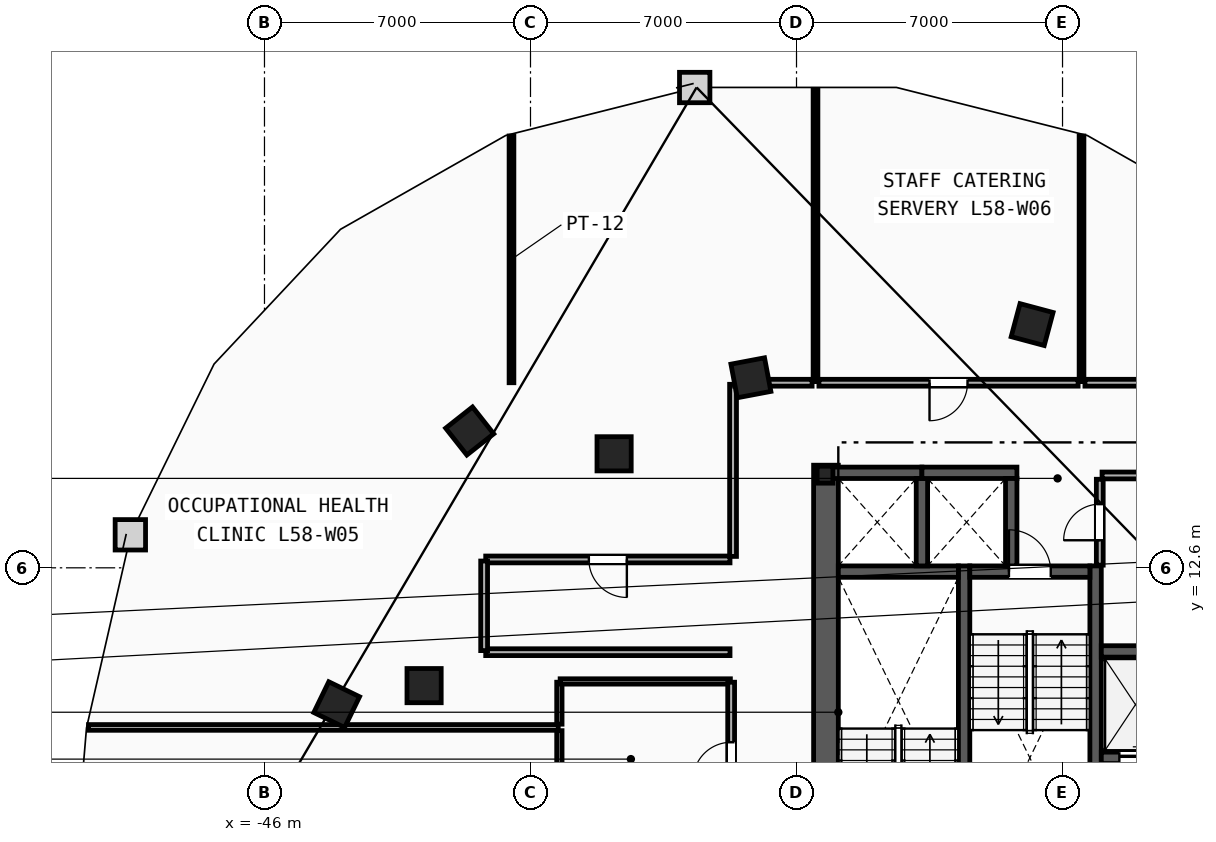
"""IFC4 building model, lengths in metres.
Left out: names, types, materials, properties, quantities, classifications, styles, units other than length and angle.
Written with IfcOpenShell. Run it as: python <this file> out.ifc"""

import sys

from ifc_helpers import new_model, si_unit, direction, frame, frame_2d, origin, origin_2d, place, context, subcontext, project, spatial, rectangle, i_section, extrude, element, fill, save


model = new_model("IFC4")
c1 = context("Model", 3, precision=1e-05, world=origin(), true_north=direction((0.0, 1.0)))
c2 = subcontext(c1, "Body", "Model", "MODEL_VIEW")
j1 = project(units=[si_unit("LENGTHUNIT", "METRE"), si_unit("PLANEANGLEUNIT", "RADIAN")], contexts=[c1])
p1 = place(None, origin())
s1 = spatial("IfcSite", under=j1, at=p1, CompositionType="ELEMENT")
p2 = place(p1, origin())
s2 = spatial("IfcBuilding", under=s1, at=p2, CompositionType="ELEMENT")
p3 = place(p2, frame((0.0, 0.0, 220.6)))
s3 = spatial("IfcBuildingStorey", under=s2, at=p3, CompositionType="ELEMENT", Elevation=220.6)
p4 = place(p3, frame((-31.25, 15.05, 0.0), z_axis=(0.0, 0.0, 1.0), x_axis=(1.0, 0.0, 0.0)))
e1 = element("IfcColumn", 1, at=p4, inside=s3, PredefinedType="COLUMN", context=c2, shape_type="SweptSolid", body=[
    extrude(i_section(OverallWidth=0.416, OverallDepth=0.446, WebThickness=0.039, FlangeThickness=0.063, FilletRadius=0.018, at=origin_2d()), origin(), (0.0, 0.0, 1.0), 3.6),
])
for number, where, z_axis, x_axis in (
    (2, (-41.8, 9.5, 0.0), (0.0, 0.0, 1.0), (1.0, 0.0, 0.0)),
    (3, (-36.8, 15.6, 0.0), (0.0, 0.0, 1.0), (1.0, 0.0, 0.0)),
    (4, (-25.8, 19.0, 0.0), (0.0, 0.0, 1.0), (-0.966, 0.259, 0.0)),
    (5, (-33.2, 17.6, 0.0), (0.0, 0.0, 1.0), (-0.983, -0.186, 0.0)),
    (6, (-40.6, 16.2, 0.0), (0.0, 0.0, 1.0), (-0.785, -0.619, 0.0)),
    (7, (-44.1, 9.0, 0.0), (0.0, 0.0, 1.0), (-0.437, -0.899, 0.0)),
):
    element("IfcColumn", number, at=place(p3, frame(where, z_axis=z_axis, x_axis=x_axis)), inside=s3, PredefinedType="COLUMN", context=c2, shape_type="SweptSolid", body=[
        extrude(rectangle(XDim=0.9, YDim=0.9, at=origin_2d()), origin(), (0.0, 0.0, 1.0), 3.6),
    ])
p5 = place(p3, frame((-31.225, 1.97, 0.0), z_axis=(0.0, 0.0, 1.0), x_axis=(0.0, 1.0, 0.0)))
e8 = element("IfcWall", 8, at=p5, inside=s3, PredefinedType="SHEAR", context=c2, shape_type="SweptSolid", body=[
    extrude(rectangle(XDim=13.33, YDim=0.65, at=frame_2d((6.665, 0.0))), origin(), (0.0, 0.0, 1.0), 3.34),
])
for number, where, z_axis, x_axis in (
    (9, (-27.59, 1.97, 0.0), (0.0, 0.0, 1.0), (0.0, 1.0, 0.0)),
    (10, (-24.13, 1.97, 0.0), (0.0, 0.0, 1.0), (0.0, 1.0, 0.0)),
):
    element("IfcWall", number, at=place(p3, frame(where, z_axis=z_axis, x_axis=x_axis)), inside=s3, PredefinedType="SHEAR", context=c2, shape_type="SweptSolid", body=[
        extrude(rectangle(XDim=10.68, YDim=0.3, at=frame_2d((5.34, 0.0))), origin(), (0.0, 0.0, 1.0), 3.34),
    ])
p6 = place(p3, frame((-30.9, 12.5, 0.0), z_axis=(0.0, 0.0, 1.0), x_axis=(1.0, 0.0, 0.0)))
e11 = element("IfcWall", 11, at=p6, inside=s3, PredefinedType="SHEAR", context=c2, shape_type="SweptSolid", body=[
    extrude(rectangle(XDim=3.16, YDim=0.3, at=frame_2d((1.58, 0.0))), origin(), (0.0, 0.0, 1.0), 3.34),
])
p7 = place(p3, frame((-27.44, 12.5, 0.0), z_axis=(0.0, 0.0, 1.0), x_axis=(1.0, 0.0, 0.0)))
e12 = element("IfcWall", 12, at=p7, inside=s3, PredefinedType="SHEAR", context=c2, shape_type="SweptSolid", body=[
    extrude(rectangle(XDim=3.16, YDim=0.3, at=frame_2d((1.58, 0.0))), origin(), (0.0, 0.0, 1.0), 3.34),
])
p8 = place(p7, frame((1.03, 0.0, 0.0)))
e13 = element("IfcOpeningElement", 13, at=p8, cuts=e12, PredefinedType="OPENING", context=c2, shape_type="SweptSolid", body=[
    extrude(rectangle(XDim=1.1, YDim=2.15, at=frame_2d((0.55, 1.075))), frame((0.0, 0.16, 0.0), z_axis=(0.0, -1.0, 0.0), x_axis=(1.0, 0.0, 0.0)), (0.0, 0.0, 1.0), 0.32),
])
p9 = place(p3, frame((-23.98, 7.6, 0.0), z_axis=(0.0, 0.0, 1.0), x_axis=(1.0, 0.0, 0.0)))
e14 = element("IfcWall", 14, at=p9, inside=s3, PredefinedType="SHEAR", context=c2, shape_type="SweptSolid", body=[
    extrude(rectangle(XDim=2.1, YDim=0.3, at=frame_2d((1.05, 0.0))), origin(), (0.0, 0.0, 1.0), 3.34),
])
p10 = place(p9, frame((0.475, 0.0, 0.0)))
e15 = element("IfcOpeningElement", 15, at=p10, cuts=e14, PredefinedType="OPENING", context=c2, shape_type="SweptSolid", body=[
    extrude(rectangle(XDim=1.15, YDim=2.2, at=frame_2d((0.575, 1.1))), frame((0.0, 0.16, 0.0), z_axis=(0.0, -1.0, 0.0), x_axis=(1.0, 0.0, 0.0)), (0.0, 0.0, 1.0), 0.32),
])
p11 = place(p3, frame((-23.98, 10.4, 0.0), z_axis=(0.0, 0.0, 1.0), x_axis=(1.0, 0.0, 0.0)))
e16 = element("IfcWall", 16, at=p11, inside=s3, PredefinedType="SHEAR", context=c2, shape_type="SweptSolid", body=[
    extrude(rectangle(XDim=2.1, YDim=0.3, at=frame_2d((1.05, 0.0))), origin(), (0.0, 0.0, 1.0), 3.34),
])
p12 = place(p3, frame((-31.2, 15.1, 0.0), z_axis=(0.0, 0.0, 1.0), x_axis=(1.0, 0.0, 0.0)))
e17 = element("IfcWall", 17, at=p12, inside=s3, PredefinedType="SHEAR", context=c2, shape_type="SweptSolid", body=[
    extrude(rectangle(XDim=2.5, YDim=0.3, at=frame_2d((1.25, 0.0))), origin(), (0.0, 0.0, 1.0), 3.34),
])
p13 = place(p3, frame((-28.7, 12.65, 0.0), z_axis=(0.0, 0.0, 1.0), x_axis=(0.0, 1.0, 0.0)))
e18 = element("IfcWall", 18, at=p13, inside=s3, PredefinedType="SHEAR", context=c2, shape_type="SweptSolid", body=[
    extrude(rectangle(XDim=2.3, YDim=0.3, at=frame_2d((1.15, 0.0))), origin(), (0.0, 0.0, 1.0), 3.34),
])
p14 = place(p3, frame((-28.7, 15.1, 0.0), z_axis=(0.0, 0.0, 1.0), x_axis=(1.0, 0.0, 0.0)))
e19 = element("IfcWall", 19, at=p14, inside=s3, PredefinedType="SHEAR", context=c2, shape_type="SweptSolid", body=[
    extrude(rectangle(XDim=2.5, YDim=0.3, at=frame_2d((1.25, 0.0))), origin(), (0.0, 0.0, 1.0), 3.34),
])
p15 = place(p3, frame((-26.35, 12.65, 0.0), z_axis=(0.0, 0.0, 1.0), x_axis=(0.0, 1.0, 0.0)))
e20 = element("IfcWall", 20, at=p15, inside=s3, PredefinedType="SHEAR", context=c2, shape_type="SweptSolid", body=[
    extrude(rectangle(XDim=2.3, YDim=0.3, at=frame_2d((1.15, 0.0))), origin(), (0.0, 0.0, 1.0), 3.34),
])
p16 = place(p3, frame((-23.96, 15.03, 0.0), z_axis=(0.0, 0.0, 1.0), x_axis=(1.0, 0.0, 0.0)))
e21 = element("IfcWall", 21, at=p16, inside=s3, PredefinedType="PARTITIONING", context=c2, shape_type="SweptSolid", body=[
    extrude(rectangle(XDim=2.61, YDim=0.18, at=frame_2d((1.305, 0.0))), origin(), (0.0, 0.0, 1.0), 2.413),
])
p17 = place(p3, frame((-24.02, 12.67, 0.0), z_axis=(0.0, 0.0, 1.0), x_axis=(0.0, 1.0, 0.0)))
e22 = element("IfcWall", 22, at=p17, inside=s3, PredefinedType="PARTITIONING", context=c2, shape_type="SweptSolid", body=[
    extrude(rectangle(XDim=2.26, YDim=0.18, at=frame_2d((1.13, 0.0))), origin(), (0.0, 0.0, 1.0), 3.34),
])
p18 = place(p17, frame((0.655, 0.0, 0.0)))
e23 = element("IfcOpeningElement", 23, at=p18, cuts=e22, PredefinedType="OPENING", context=c2, shape_type="SweptSolid", body=[
    extrude(rectangle(XDim=0.95, YDim=2.1, at=frame_2d((0.475, 1.05))), frame((0.0, 0.1, 0.0), z_axis=(0.0, -1.0, 0.0), x_axis=(1.0, 0.0, 0.0)), (0.0, 0.0, 1.0), 0.2),
])
p19 = place(p3, frame((-38.24, 5.415, 0.0), z_axis=(0.0, 0.0, 1.0), x_axis=(0.0, 1.0, 0.0)))
e24 = element("IfcWall", 24, at=p19, inside=s3, PredefinedType="PARTITIONING", context=c2, shape_type="SweptSolid", body=[
    extrude(rectangle(XDim=2.9, YDim=0.14, at=frame_2d((1.45, 0.0))), origin(), (0.0, 0.0, 1.0), 3.34),
])
p20 = place(p3, frame((-38.24, 8.485, 0.0), z_axis=(0.0, 0.0, 1.0), x_axis=(0.0, 1.0, 0.0)))
e25 = element("IfcWall", 25, at=p20, inside=s3, PredefinedType="PARTITIONING", context=c2, shape_type="SweptSolid", body=[
    extrude(rectangle(XDim=1.105, YDim=0.14, at=frame_2d((0.552, 0.0))), origin(), (0.0, 0.0, 1.0), 3.34),
])
p21 = place(p3, frame((-38.22, 9.61, 0.0), z_axis=(0.0, 0.0, 1.0), x_axis=(1.0, 0.0, 0.0)))
e26 = element("IfcWall", 26, at=p21, inside=s3, PredefinedType="PARTITIONING", context=c2, shape_type="SweptSolid", body=[
    extrude(rectangle(XDim=4.48, YDim=0.14, at=frame_2d((2.24, 0.0))), origin(), (0.0, 0.0, 1.0), 3.34),
])
p22 = place(p3, frame((-33.72, 5.43, 0.0), z_axis=(0.0, 0.0, 1.0), x_axis=(0.0, 1.0, 0.0)))
e27 = element("IfcWall", 27, at=p22, inside=s3, PredefinedType="PARTITIONING", context=c2, shape_type="SweptSolid", body=[
    extrude(rectangle(XDim=4.16, YDim=0.18, at=frame_2d((2.08, 0.0))), origin(), (0.0, 0.0, 1.0), 3.34),
])
p23 = place(p22, frame((1.58, 0.0, 0.0)))
e28 = element("IfcOpeningElement", 28, at=p23, cuts=e27, PredefinedType="OPENING", context=c2, shape_type="SweptSolid", body=[
    extrude(rectangle(XDim=1.0, YDim=2.15, at=frame_2d((0.5, 1.075))), frame((0.0, 0.1, 0.0), z_axis=(0.0, -1.0, 0.0), x_axis=(1.0, 0.0, 0.0)), (0.0, 0.0, 1.0), 0.2),
])
p24 = place(p3, frame((-50.63, 8.4, 0.0), z_axis=(0.0, 0.0, 1.0), x_axis=(1.0, 0.0, 0.0)))
e29 = element("IfcWall", 29, at=p24, inside=s3, PredefinedType="PARTITIONING", context=c2, shape_type="SweptSolid", body=[
    extrude(rectangle(XDim=12.36, YDim=0.15, at=frame_2d((6.18, 0.0))), origin(), (0.0, 0.0, 1.0), 3.34),
])
p25 = place(p3, frame((-39.5, 17.47, 0.0), z_axis=(0.0, 0.0, 1.0), x_axis=(0.0, 1.0, 0.0)))
e30 = element("IfcWall", 30, at=p25, inside=s3, PredefinedType="PARTITIONING", context=c2, shape_type="SweptSolid", body=[
    extrude(rectangle(XDim=6.493, YDim=0.125, at=frame_2d((3.246, 0.0))), origin(), (0.0, 0.0, 1.0), 3.34),
])
p26 = place(p3, frame((-31.5, 17.5, 0.0), z_axis=(0.0, 0.0, 1.0), x_axis=(0.0, 1.0, 0.0)))
e31 = element("IfcWall", 31, at=p26, inside=s3, PredefinedType="PARTITIONING", context=c2, shape_type="SweptSolid", body=[
    extrude(rectangle(XDim=7.69, YDim=0.125, at=frame_2d((3.845, 0.0))), origin(), (0.0, 0.0, 1.0), 3.34),
])
p27 = place(p3, frame((-24.5, 17.5, 0.0), z_axis=(0.0, 0.0, 1.0), x_axis=(0.0, 1.0, 0.0)))
e32 = element("IfcWall", 32, at=p27, inside=s3, PredefinedType="PARTITIONING", context=c2, shape_type="SweptSolid", body=[
    extrude(rectangle(XDim=6.463, YDim=0.125, at=frame_2d((3.231, 0.0))), origin(), (0.0, 0.0, 1.0), 3.34),
])
p28 = place(p3, frame((-16.822, 17.47, 0.0), z_axis=(0.0, 0.0, 1.0), x_axis=(-1.0, 0.0, 0.0)))
e33 = element("IfcWall", 33, at=p28, inside=s3, PredefinedType="PARTITIONING", context=c2, shape_type="SweptSolid", body=[
    extrude(rectangle(XDim=7.588, YDim=0.18, at=frame_2d((3.794, 0.0))), origin(), (0.0, 0.0, 1.0), 3.34),
])
p29 = place(p3, frame((-33.75, 12.82, 0.0), z_axis=(0.0, 0.0, 1.0), x_axis=(-1.0, 0.0, 0.0)))
e34 = element("IfcWall", 34, at=p29, inside=s3, PredefinedType="PARTITIONING", context=c2, shape_type="SweptSolid", body=[
    extrude(rectangle(XDim=6.428, YDim=0.18, at=frame_2d((3.214, 0.0))), origin(), (0.0, 0.0, 1.0), 3.34),
])
p30 = place(p29, frame((2.714, 0.0, 0.0)))
e35 = element("IfcOpeningElement", 35, at=p30, cuts=e34, PredefinedType="OPENING", context=c2, shape_type="SweptSolid", body=[
    extrude(rectangle(XDim=1.0, YDim=2.15, at=frame_2d((0.5, 1.075))), frame((0.0, 0.1, 0.0), z_axis=(0.0, -1.0, 0.0), x_axis=(1.0, 0.0, 0.0)), (0.0, 0.0, 1.0), 0.2),
])
p31 = place(p3, frame((-40.178, 10.38, 0.0), z_axis=(0.0, 0.0, 1.0), x_axis=(1.0, 0.0, 0.0)))
e36 = element("IfcWall", 36, at=p31, inside=s3, PredefinedType="PARTITIONING", context=c2, shape_type="SweptSolid", body=[
    extrude(rectangle(XDim=6.428, YDim=0.18, at=frame_2d((3.214, 0.0))), origin(), (0.0, 0.0, 1.0), 3.34),
])
p32 = place(p3, frame((-33.67, 17.428, 0.0), z_axis=(0.0, 0.0, 1.0), x_axis=(0.0, -1.0, 0.0)))
e37 = element("IfcWall", 37, at=p32, inside=s3, PredefinedType="PARTITIONING", context=c2, shape_type="SweptSolid", body=[
    extrude(rectangle(XDim=4.529, YDim=0.18, at=frame_2d((2.264, 0.0))), origin(), (0.0, 0.0, 1.0), 3.34),
])
p33 = place(p3, frame((-40.22, 12.779, 0.0), z_axis=(0.0, 0.0, 1.0), x_axis=(0.0, -1.0, 0.0)))
e38 = element("IfcWall", 38, at=p33, inside=s3, PredefinedType="PARTITIONING", context=c2, shape_type="SweptSolid", body=[
    extrude(rectangle(XDim=2.357, YDim=0.18, at=frame_2d((1.179, 0.0))), origin(), (0.0, 0.0, 1.0), 3.34),
])
p34 = place(p3, frame((-31.59, 17.47, 0.0), z_axis=(0.0, 0.0, 1.0), x_axis=(-1.0, 0.0, 0.0)))
e39 = element("IfcWall", 39, at=p34, inside=s3, PredefinedType="PARTITIONING", context=c2, shape_type="SweptSolid", body=[
    extrude(rectangle(XDim=2.038, YDim=0.18, at=frame_2d((1.019, 0.0))), origin(), (0.0, 0.0, 1.0), 3.34),
])
p35 = place(p3, frame((-24.59, 17.47, 0.0), z_axis=(0.0, 0.0, 1.0), x_axis=(-1.0, 0.0, 0.0)))
e40 = element("IfcWall", 40, at=p35, inside=s3, PredefinedType="PARTITIONING", context=c2, shape_type="SweptSolid", body=[
    extrude(rectangle(XDim=6.82, YDim=0.18, at=frame_2d((3.41, 0.0))), origin(), (0.0, 0.0, 1.0), 3.34),
])
p36 = place(p35, frame((2.91, 0.0, 0.0)))
e41 = element("IfcOpeningElement", 41, at=p36, cuts=e40, PredefinedType="OPENING", context=c2, shape_type="SweptSolid", body=[
    extrude(rectangle(XDim=1.0, YDim=2.15, at=frame_2d((0.5, 1.075))), frame((0.0, 0.1, 0.0), z_axis=(0.0, -1.0, 0.0), x_axis=(1.0, 0.0, 0.0)), (0.0, 0.0, 1.0), 0.2),
])
p37 = place(p8, origin())
e42 = element("IfcDoor", 42, at=p37, inside=s3, OperationType="SINGLE_SWING_LEFT", PredefinedType="DOOR", context=c2, shape_type="SweptSolid", body=[
    extrude(rectangle(XDim=1.1, YDim=2.15, at=frame_2d((0.55, 1.075))), frame((0.0, 0.025, 0.0), z_axis=(0.0, -1.0, 0.0), x_axis=(1.0, 0.0, 0.0)), (0.0, 0.0, 1.0), 0.05),
])
fill(e13, e42)
p38 = place(p10, origin())
e43 = element("IfcDoor", 43, at=p38, inside=s3, OperationType="SLIDING_TO_LEFT", PredefinedType="TRAPDOOR", context=c2, shape_type="SweptSolid", body=[
    extrude(rectangle(XDim=1.15, YDim=2.2, at=frame_2d((0.575, 1.1))), frame((0.0, 0.025, 0.0), z_axis=(0.0, -1.0, 0.0), x_axis=(1.0, 0.0, 0.0)), (0.0, 0.0, 1.0), 0.05),
])
fill(e15, e43)
p39 = place(p36, origin())
e44 = element("IfcDoor", 44, at=p39, inside=s3, OperationType="SINGLE_SWING_RIGHT", PredefinedType="DOOR", context=c2, shape_type="SweptSolid", body=[
    extrude(rectangle(XDim=1.0, YDim=2.15, at=frame_2d((0.5, 1.075))), frame((0.0, 0.025, 0.0), z_axis=(0.0, -1.0, 0.0), x_axis=(1.0, 0.0, 0.0)), (0.0, 0.0, 1.0), 0.05),
])
fill(e41, e44)
p40 = place(p30, origin())
e45 = element("IfcDoor", 45, at=p40, inside=s3, OperationType="SINGLE_SWING_LEFT", PredefinedType="DOOR", context=c2, shape_type="SweptSolid", body=[
    extrude(rectangle(XDim=1.0, YDim=2.15, at=frame_2d((0.5, 1.075))), frame((0.0, 0.025, 0.0), z_axis=(0.0, -1.0, 0.0), x_axis=(1.0, 0.0, 0.0)), (0.0, 0.0, 1.0), 0.05),
])
fill(e35, e45)
p41 = place(p23, origin())
e46 = element("IfcDoor", 46, at=p41, inside=s3, OperationType="SINGLE_SWING_LEFT", PredefinedType="DOOR", context=c2, shape_type="SweptSolid", body=[
    extrude(rectangle(XDim=1.0, YDim=2.15, at=frame_2d((0.5, 1.075))), frame((0.0, 0.025, 0.0), z_axis=(0.0, -1.0, 0.0), x_axis=(1.0, 0.0, 0.0)), (0.0, 0.0, 1.0), 0.05),
])
fill(e28, e46)
p42 = place(p18, origin())
e47 = element("IfcDoor", 47, at=p42, inside=s3, OperationType="SINGLE_SWING_LEFT", PredefinedType="DOOR", context=c2, shape_type="SweptSolid", body=[
    extrude(rectangle(XDim=0.95, YDim=2.1, at=frame_2d((0.475, 1.05))), frame((0.0, 0.025, 0.0), z_axis=(0.0, -1.0, 0.0), x_axis=(1.0, 0.0, 0.0)), (0.0, 0.0, 1.0), 0.05),
])
fill(e23, e47)
save(model, sys.argv[1])
